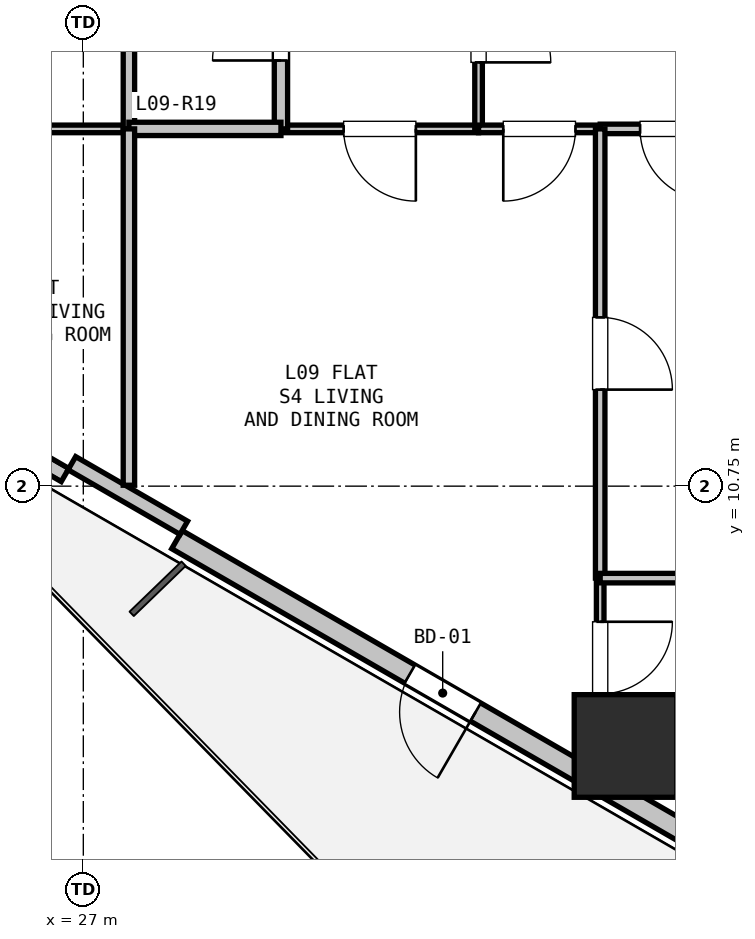
"""IFC4 building model, lengths in metres.
Left out: names, types, materials, properties, quantities, classifications, styles, units other than length and angle.
Written with IfcOpenShell. Run it as: python <this file> out.ifc"""

import sys

from ifc_helpers import new_model, si_unit, direction, frame, frame_2d, origin, origin_2d, place, context, subcontext, project, spatial, rectangle, hollow_rectangle, extrude, element, fill, save


model = new_model("IFC4")
c1 = context("Model", 3, precision=1e-05, world=origin(), true_north=direction((0.0, 1.0)))
c2 = subcontext(c1, "Body", "Model", "MODEL_VIEW")
j1 = project(units=[si_unit("LENGTHUNIT", "METRE"), si_unit("PLANEANGLEUNIT", "RADIAN")], contexts=[c1])
p1 = place(None, origin())
s1 = spatial("IfcSite", under=j1, at=p1, CompositionType="ELEMENT")
p2 = place(p1, origin())
s2 = spatial("IfcBuilding", under=s1, at=p2, CompositionType="ELEMENT")
p3 = place(p2, frame((0.0, 0.0, 35.7)))
s3 = spatial("IfcBuildingStorey", under=s2, at=p3, CompositionType="ELEMENT", Elevation=35.7)
p4 = place(p3, frame((34.133, 7.332, 0.0), z_axis=(0.0, 0.0, 1.0), x_axis=(1.0, 0.0, 0.0)))
e1 = element("IfcColumn", 1, at=p4, inside=s3, PredefinedType="COLUMN", context=c2, shape_type="SweptSolid", body=[
    extrude(hollow_rectangle(XDim=1.35, YDim=1.35, WallThickness=0.036, at=origin_2d()), origin(), (0.0, 0.0, 1.0), 3.3),
])
p5 = place(p3, frame((39.207, 3.71, 0.0), z_axis=(0.0, 0.0, 1.0), x_axis=(-0.86603192154, 0.499988710747, 0.0)))
e2 = element("IfcWall", 2, at=p5, inside=s3, PredefinedType="SOLIDWALL", context=c2, shape_type="SweptSolid", body=[
    extrude(rectangle(XDim=12.673, YDim=0.275, at=frame_2d((6.336, 0.0))), origin(), (0.0, 0.0, 1.0), 2.66),
])
p6 = place(p5, frame((8.136, 0.0, 0.0)))
e3 = element("IfcOpeningElement", 3, at=p6, cuts=e2, PredefinedType="OPENING", context=c2, shape_type="SweptSolid", body=[
    extrude(rectangle(XDim=1.0, YDim=2.1, at=frame_2d((0.5, 1.05))), frame((0.0, 0.147, 0.0), z_axis=(0.0, -1.0, 0.0), x_axis=(1.0, 0.0, 0.0)), (0.0, 0.0, 1.0), 0.295),
])
p7 = place(p5, frame((2.971, 0.0, 0.9)))
e4 = element("IfcOpeningElement", 4, at=p7, cuts=e2, PredefinedType="OPENING", context=c2, shape_type="SweptSolid", body=[
    extrude(rectangle(XDim=1.2, YDim=1.4, at=frame_2d((0.6, 0.7))), frame((0.0, 0.147, 0.0), z_axis=(0.0, -1.0, 0.0), x_axis=(1.0, 0.0, 0.0)), (0.0, 0.0, 1.0), 0.295),
])
p8 = place(p3, frame((26.76, 10.896, 0.0), z_axis=(0.0, 0.0, 1.0), x_axis=(-0.866027351828, 0.499996625875, 0.0)))
e5 = element("IfcWall", 5, at=p8, inside=s3, PredefinedType="PARAPET", context=c2, shape_type="SweptSolid", body=[
    extrude(rectangle(XDim=11.973, YDim=0.2, at=frame_2d((5.987, 0.0))), origin(), (0.0, 0.0, 1.0), 0.2),
])
p9 = place(p3, frame((28.322, 10.202, 0.0), z_axis=(0.0, 0.0, 1.0), x_axis=(-0.86605165483, 0.499954529098, 0.0)))
e6 = element("IfcWall", 6, at=p9, inside=s3, PredefinedType="PARAPET", context=c2, shape_type="SweptSolid", body=[
    extrude(rectangle(XDim=1.7, YDim=0.2, at=frame_2d((0.85, 0.0))), origin(), (0.0, 0.0, 1.0), 2.66),
])
p10 = place(p3, frame((32.2, 15.45, 0.0), z_axis=(0.0, 0.0, 1.0), x_axis=(-1.0, 0.0, 0.0)))
e7 = element("IfcWall", 7, at=p10, inside=s3, PredefinedType="PARTITIONING", context=c2, shape_type="SweptSolid", body=[
    extrude(rectangle(XDim=2.6, YDim=0.1, at=frame_2d((1.3, 0.0))), origin(), (0.0, 0.0, 1.0), 3.04),
])
p11 = place(p10, frame((0.825, 0.0, 0.0)))
e8 = element("IfcOpeningElement", 8, at=p11, cuts=e7, PredefinedType="OPENING", context=c2, shape_type="SweptSolid", body=[
    extrude(rectangle(XDim=0.95, YDim=2.1, at=frame_2d((0.475, 1.05))), frame((0.0, 0.06, 0.0), z_axis=(0.0, -1.0, 0.0), x_axis=(1.0, 0.0, 0.0)), (0.0, 0.0, 1.0), 0.12),
])
p12 = place(p3, frame((29.6, 15.45, 0.0), z_axis=(0.0, 0.0, 1.0), x_axis=(0.0, 1.0, 0.0)))
e9 = element("IfcWall", 9, at=p12, inside=s3, PredefinedType="PLUMBINGWALL", context=c2, shape_type="SweptSolid", body=[
    extrude(rectangle(XDim=2.7, YDim=0.175, at=frame_2d((1.35, 0.0))), origin(), (0.0, 0.0, 1.0), 3.04),
])
p13 = place(p12, frame((0.9, 0.0, 0.0)))
e10 = element("IfcOpeningElement", 10, at=p13, cuts=e9, PredefinedType="OPENING", context=c2, shape_type="SweptSolid", body=[
    extrude(rectangle(XDim=0.9, YDim=2.1, at=frame_2d((0.45, 1.05))), frame((0.0, 0.097, 0.0), z_axis=(0.0, -1.0, 0.0), x_axis=(1.0, 0.0, 0.0)), (0.0, 0.0, 1.0), 0.195),
])
p14 = place(p3, frame((32.2, 18.15, 0.0), z_axis=(0.0, 0.0, 1.0), x_axis=(0.0, -1.0, 0.0)))
e11 = element("IfcWall", 11, at=p14, inside=s3, PredefinedType="PARTITIONING", context=c2, shape_type="SweptSolid", body=[
    extrude(rectangle(XDim=2.7, YDim=0.1, at=frame_2d((1.35, 0.0))), origin(), (0.0, 0.0, 1.0), 3.04),
])
p15 = place(p14, frame((0.875, 0.0, 0.0)))
e12 = element("IfcOpeningElement", 12, at=p15, cuts=e11, PredefinedType="OPENING", context=c2, shape_type="SweptSolid", body=[
    extrude(rectangle(XDim=0.95, YDim=2.1, at=frame_2d((0.475, 1.05))), frame((0.0, 0.06, 0.0), z_axis=(0.0, -1.0, 0.0), x_axis=(1.0, 0.0, 0.0)), (0.0, 0.0, 1.0), 0.12),
])
p16 = place(p3, frame((27.6, 15.45, 0.0), z_axis=(0.0, 0.0, 1.0), x_axis=(-1.0, 0.0, 0.0)))
e13 = element("IfcWall", 13, at=p16, inside=s3, PredefinedType="PARTITIONING", context=c2, shape_type="SweptSolid", body=[
    extrude(rectangle(XDim=3.2, YDim=0.1, at=frame_2d((1.6, 0.0))), origin(), (0.0, 0.0, 1.0), 2.338),
])
p17 = place(p16, frame((1.125, 0.0, 0.0)))
e14 = element("IfcOpeningElement", 14, at=p17, cuts=e13, PredefinedType="OPENING", context=c2, shape_type="SweptSolid", body=[
    extrude(rectangle(XDim=0.95, YDim=2.1, at=frame_2d((0.475, 1.05))), frame((0.0, 0.06, 0.0), z_axis=(0.0, -1.0, 0.0), x_axis=(1.0, 0.0, 0.0)), (0.0, 0.0, 1.0), 0.12),
])
p18 = place(p3, frame((27.6, 18.15, 0.0), z_axis=(0.0, 0.0, 1.0), x_axis=(0.0, -1.0, 0.0)))
e15 = element("IfcWall", 15, at=p18, inside=s3, PredefinedType="PARTITIONING", context=c2, shape_type="SweptSolid", body=[
    extrude(rectangle(XDim=2.7, YDim=0.15, at=frame_2d((1.35, 0.0))), origin(), (0.0, 0.0, 1.0), 3.04),
])
p19 = place(p3, frame((29.6, 15.45, 0.0), z_axis=(0.0, 0.0, 1.0), x_axis=(-1.0, 0.0, 0.0)))
e16 = element("IfcWall", 16, at=p19, inside=s3, PredefinedType="PLUMBINGWALL", context=c2, shape_type="SweptSolid", body=[
    extrude(rectangle(XDim=2.0, YDim=0.175, at=frame_2d((1.0, 0.0))), origin(), (0.0, 0.0, 1.0), 3.04),
])
p20 = place(p3, frame((35.8, 15.45, 0.0), z_axis=(0.0, 0.0, 1.0), x_axis=(-1.0, 0.0, 0.0)))
e17 = element("IfcWall", 17, at=p20, inside=s3, PredefinedType="PARTITIONING", context=c2, shape_type="SweptSolid", body=[
    extrude(rectangle(XDim=2.0, YDim=0.125, at=frame_2d((1.0, 0.0))), origin(), (0.0, 0.0, 1.0), 3.04),
])
p21 = place(p20, frame((0.525, 0.0, 0.0)))
e18 = element("IfcOpeningElement", 18, at=p21, cuts=e17, PredefinedType="OPENING", context=c2, shape_type="SweptSolid", body=[
    extrude(rectangle(XDim=0.95, YDim=2.1, at=frame_2d((0.475, 1.05))), frame((0.0, 0.073, 0.0), z_axis=(0.0, -1.0, 0.0), x_axis=(1.0, 0.0, 0.0)), (0.0, 0.0, 1.0), 0.145),
])
p22 = place(p3, frame((33.8, 15.45, 0.0), z_axis=(0.0, 0.0, 1.0), x_axis=(-1.0, 0.0, 0.0)))
e19 = element("IfcWall", 19, at=p22, inside=s3, PredefinedType="PARTITIONING", context=c2, shape_type="SweptSolid", body=[
    extrude(rectangle(XDim=1.6, YDim=0.1, at=frame_2d((0.8, 0.0))), origin(), (0.0, 0.0, 1.0), 3.04),
])
p23 = place(p22, frame((0.325, 0.0, 0.0)))
e20 = element("IfcOpeningElement", 20, at=p23, cuts=e19, PredefinedType="OPENING", context=c2, shape_type="SweptSolid", body=[
    extrude(rectangle(XDim=0.95, YDim=2.1, at=frame_2d((0.475, 1.05))), frame((0.0, 0.06, 0.0), z_axis=(0.0, -1.0, 0.0), x_axis=(1.0, 0.0, 0.0)), (0.0, 0.0, 1.0), 0.12),
])
p24 = place(p3, frame((27.6, 15.45, 0.0), z_axis=(0.0, 0.0, 1.0), x_axis=(0.0, -1.0, 0.0)))
e21 = element("IfcWall", 21, at=p24, inside=s3, PredefinedType="PARTITIONING", context=c2, shape_type="SweptSolid", body=[
    extrude(rectangle(XDim=4.688, YDim=0.15, at=frame_2d((2.344, 0.0))), origin(), (0.0, 0.0, 1.0), 2.338),
])
p25 = place(p3, frame((33.8, 15.45, 0.0), z_axis=(0.0, 0.0, 1.0), x_axis=(0.0, -1.0, 0.0)))
e22 = element("IfcWall", 22, at=p25, inside=s3, PredefinedType="PARTITIONING", context=c2, shape_type="SweptSolid", body=[
    extrude(rectangle(XDim=5.91, YDim=0.125, at=frame_2d((2.955, 0.0))), origin(), (0.0, 0.0, 1.0), 3.04),
])
p26 = place(p25, frame((2.48, 0.0, 0.0)))
e23 = element("IfcOpeningElement", 23, at=p26, cuts=e22, PredefinedType="OPENING", context=c2, shape_type="SweptSolid", body=[
    extrude(rectangle(XDim=0.95, YDim=2.1, at=frame_2d((0.475, 1.05))), frame((0.0, 0.073, 0.0), z_axis=(0.0, -1.0, 0.0), x_axis=(1.0, 0.0, 0.0)), (0.0, 0.0, 1.0), 0.145),
])
p27 = place(p3, frame((33.8, 9.54, 0.0), z_axis=(0.0, 0.0, 1.0), x_axis=(0.0, -1.0, 0.0)))
e24 = element("IfcWall", 24, at=p27, inside=s3, PredefinedType="PARTITIONING", context=c2, shape_type="SweptSolid", body=[
    extrude(rectangle(XDim=2.522, YDim=0.1, at=frame_2d((1.261, 0.0))), origin(), (0.0, 0.0, 1.0), 2.338),
])
p28 = place(p27, frame((0.574, 0.0, 0.0)))
e25 = element("IfcOpeningElement", 25, at=p28, cuts=e24, PredefinedType="OPENING", context=c2, shape_type="SweptSolid", body=[
    extrude(rectangle(XDim=0.95, YDim=2.1, at=frame_2d((0.475, 1.05))), frame((0.0, 0.06, 0.0), z_axis=(0.0, -1.0, 0.0), x_axis=(1.0, 0.0, 0.0)), (0.0, 0.0, 1.0), 0.12),
])
p29 = place(p3, frame((33.8, 9.54, 0.0), z_axis=(0.0, 0.0, 1.0), x_axis=(1.0, 0.0, 0.0)))
e26 = element("IfcWall", 26, at=p29, inside=s3, PredefinedType="PARTITIONING", context=c2, shape_type="SweptSolid", body=[
    extrude(rectangle(XDim=5.03, YDim=0.125, at=frame_2d((2.515, 0.0))), origin(), (0.0, 0.0, 1.0), 3.04),
])
p30 = place(p29, frame((2.04, 0.0, 0.0)))
e27 = element("IfcOpeningElement", 27, at=p30, cuts=e26, PredefinedType="OPENING", context=c2, shape_type="SweptSolid", body=[
    extrude(rectangle(XDim=0.95, YDim=2.1, at=frame_2d((0.475, 1.05))), frame((0.0, 0.073, 0.0), z_axis=(0.0, -1.0, 0.0), x_axis=(1.0, 0.0, 0.0)), (0.0, 0.0, 1.0), 0.145),
])
p31 = place(p6, origin())
e28 = element("IfcDoor", 28, at=p31, inside=s3, OperationType="SINGLE_SWING_LEFT", PredefinedType="DOOR", context=c2, shape_type="SweptSolid", body=[
    extrude(rectangle(XDim=1.0, YDim=2.1, at=frame_2d((0.5, 1.05))), frame((0.0, 0.025, 0.0), z_axis=(0.0, -1.0, 0.0), x_axis=(1.0, 0.0, 0.0)), (0.0, 0.0, 1.0), 0.05),
])
fill(e3, e28)
p32 = place(p13, origin())
e29 = element("IfcDoor", 29, at=p32, inside=s3, OperationType="SINGLE_SWING_LEFT", PredefinedType="DOOR", context=c2, shape_type="SweptSolid", body=[
    extrude(rectangle(XDim=0.9, YDim=2.1, at=frame_2d((0.45, 1.05))), frame((0.0, 0.025, 0.0), z_axis=(0.0, -1.0, 0.0), x_axis=(1.0, 0.0, 0.0)), (0.0, 0.0, 1.0), 0.05),
])
fill(e10, e29)
p33 = place(p15, origin())
e30 = element("IfcDoor", 30, at=p33, inside=s3, OperationType="SINGLE_SWING_RIGHT", PredefinedType="DOOR", context=c2, shape_type="SweptSolid", body=[
    extrude(rectangle(XDim=0.95, YDim=2.1, at=frame_2d((0.475, 1.05))), frame((0.0, 0.025, 0.0), z_axis=(0.0, -1.0, 0.0), x_axis=(1.0, 0.0, 0.0)), (0.0, 0.0, 1.0), 0.05),
])
fill(e12, e30)
p34 = place(p11, origin())
e31 = element("IfcDoor", 31, at=p34, inside=s3, OperationType="SINGLE_SWING_LEFT", PredefinedType="DOOR", context=c2, shape_type="SweptSolid", body=[
    extrude(rectangle(XDim=0.95, YDim=2.1, at=frame_2d((0.475, 1.05))), frame((0.0, 0.025, 0.0), z_axis=(0.0, -1.0, 0.0), x_axis=(1.0, 0.0, 0.0)), (0.0, 0.0, 1.0), 0.05),
])
fill(e8, e31)
p35 = place(p23, origin())
e32 = element("IfcDoor", 32, at=p35, inside=s3, OperationType="SINGLE_SWING_RIGHT", PredefinedType="DOOR", context=c2, shape_type="SweptSolid", body=[
    extrude(rectangle(XDim=0.95, YDim=2.1, at=frame_2d((0.475, 1.05))), frame((0.0, 0.025, 0.0), z_axis=(0.0, -1.0, 0.0), x_axis=(1.0, 0.0, 0.0)), (0.0, 0.0, 1.0), 0.05),
])
fill(e20, e32)
p36 = place(p21, origin())
e33 = element("IfcDoor", 33, at=p36, inside=s3, OperationType="SINGLE_SWING_LEFT", PredefinedType="DOOR", context=c2, shape_type="SweptSolid", body=[
    extrude(rectangle(XDim=0.95, YDim=2.1, at=frame_2d((0.475, 1.05))), frame((0.0, 0.025, 0.0), z_axis=(0.0, -1.0, 0.0), x_axis=(1.0, 0.0, 0.0)), (0.0, 0.0, 1.0), 0.05),
])
fill(e18, e33)
p37 = place(p28, origin())
e34 = element("IfcDoor", 34, at=p37, inside=s3, OperationType="SINGLE_SWING_LEFT", PredefinedType="DOOR", context=c2, shape_type="SweptSolid", body=[
    extrude(rectangle(XDim=0.95, YDim=2.1, at=frame_2d((0.475, 1.05))), frame((0.0, 0.025, 0.0), z_axis=(0.0, -1.0, 0.0), x_axis=(1.0, 0.0, 0.0)), (0.0, 0.0, 1.0), 0.05),
])
fill(e25, e34)
p38 = place(p26, origin())
e35 = element("IfcDoor", 35, at=p38, inside=s3, OperationType="SINGLE_SWING_RIGHT", PredefinedType="DOOR", context=c2, shape_type="SweptSolid", body=[
    extrude(rectangle(XDim=0.95, YDim=2.1, at=frame_2d((0.475, 1.05))), frame((0.0, 0.025, 0.0), z_axis=(0.0, -1.0, 0.0), x_axis=(1.0, 0.0, 0.0)), (0.0, 0.0, 1.0), 0.05),
])
fill(e23, e35)
save(model, sys.argv[1])
